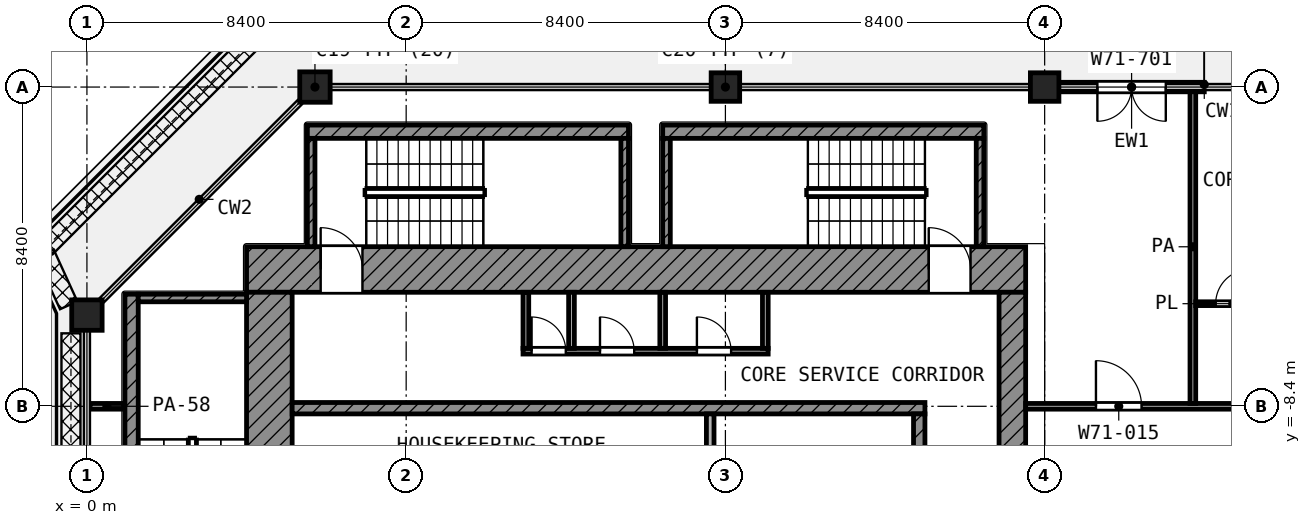
"""IFC4 building model, lengths in metres.
Left out: names, types, materials, properties, quantities, classifications, styles, units other than length and angle.
Written with IfcOpenShell. Run it as: python <this file> out.ifc"""

import sys

from ifc_helpers import new_model, si_unit, direction, frame, frame_2d, origin, origin_2d, place, context, subcontext, project, spatial, rectangle, extrude, element, fill, save


model = new_model("IFC4")
c1 = context("Model", 3, precision=1e-05, world=origin(), true_north=direction((0.0, 1.0)))
c2 = subcontext(c1, "Body", "Model", "MODEL_VIEW")
j1 = project(units=[si_unit("LENGTHUNIT", "METRE"), si_unit("PLANEANGLEUNIT", "RADIAN")], contexts=[c1])
p1 = place(None, origin())
s1 = spatial("IfcSite", under=j1, at=p1, CompositionType="ELEMENT")
p2 = place(p1, origin())
s2 = spatial("IfcBuilding", under=s1, at=p2, CompositionType="ELEMENT")
p3 = place(p2, frame((0.0, 0.0, 307.0)))
s3 = spatial("IfcBuildingStorey", under=s2, at=p3, CompositionType="ELEMENT", Elevation=307.0)
p4 = place(p3, frame((6.0, 0.0, 0.0), z_axis=(0.0, 0.0, 1.0), x_axis=(1.0, 0.0, 0.0)))
e1 = element("IfcColumn", 1, at=p4, inside=s3, PredefinedType="COLUMN", context=c2, shape_type="SweptSolid", body=[
    extrude(rectangle(XDim=0.8, YDim=0.8, at=origin_2d()), origin(), (0.0, 0.0, 1.0), 4.2),
])
for number, where, z_axis, x_axis in (
    (2, (16.8, 0.0, 0.0), (0.0, 0.0, 1.0), (1.0, 0.0, 0.0)),
    (3, (25.2, 0.0, 0.0), (0.0, 0.0, 1.0), (1.0, 0.0, 0.0)),
):
    element("IfcColumn", number, at=place(p3, frame(where, z_axis=z_axis, x_axis=x_axis)), inside=s3, PredefinedType="COLUMN", context=c2, shape_type="SweptSolid", body=[
        extrude(rectangle(XDim=0.75, YDim=0.75, at=origin_2d()), origin(), (0.0, 0.0, 1.0), 4.2),
    ])
p5 = place(p3, frame((0.0, -6.0, 0.0), z_axis=(0.0, 0.0, 1.0), x_axis=(1.0, 0.0, 0.0)))
e4 = element("IfcColumn", 4, at=p5, inside=s3, PredefinedType="COLUMN", context=c2, shape_type="SweptSolid", body=[
    extrude(rectangle(XDim=0.8, YDim=0.8, at=origin_2d()), origin(), (0.0, 0.0, 1.0), 4.2),
])
p6 = place(p3, frame((29.4, 0.0, 0.0), z_axis=(0.0, 0.0, 1.0), x_axis=(-1.0, 0.0, 0.0)))
e5 = element("IfcWall", 5, at=p6, inside=s3, PredefinedType="SOLIDWALL", context=c2, shape_type="SweptSolid", body=[
    extrude(rectangle(XDim=3.825, YDim=0.25, at=frame_2d((1.913, 0.0))), origin(), (0.0, 0.0, 1.0), 3.48),
])
p7 = place(p6, frame((1.012, 0.0, 0.0)))
e6 = element("IfcOpeningElement", 6, at=p7, cuts=e5, PredefinedType="OPENING", context=c2, shape_type="SweptSolid", body=[
    extrude(rectangle(XDim=1.8, YDim=2.1, at=frame_2d((0.9, 1.05))), frame((0.0, 0.135, 0.0), z_axis=(0.0, -1.0, 0.0), x_axis=(1.0, 0.0, 0.0)), (0.0, 0.0, 1.0), 0.27),
])
p8 = place(p3, frame((4.2, -4.8, 0.0), z_axis=(0.0, 0.0, 1.0), x_axis=(1.0, 0.0, 0.0)))
e7 = element("IfcWall", 7, at=p8, inside=s3, PredefinedType="SHEAR", context=c2, shape_type="SweptSolid", body=[
    extrude(rectangle(XDim=20.5, YDim=1.2, at=frame_2d((10.25, 0.0))), origin(), (0.0, 0.0, 1.0), 3.6),
])
p9 = place(p8, frame((1.95, 0.0, 0.0)))
e8 = element("IfcOpeningElement", 8, at=p9, cuts=e7, PredefinedType="OPENING", context=c2, shape_type="SweptSolid", body=[
    extrude(rectangle(XDim=1.1, YDim=2.1, at=frame_2d((0.55, 1.05))), frame((0.0, 0.61, 0.0), z_axis=(0.0, -1.0, 0.0), x_axis=(1.0, 0.0, 0.0)), (0.0, 0.0, 1.0), 1.22),
])
p10 = place(p8, frame((17.95, 0.0, 0.0)))
e9 = element("IfcOpeningElement", 9, at=p10, cuts=e7, PredefinedType="OPENING", context=c2, shape_type="SweptSolid", body=[
    extrude(rectangle(XDim=1.1, YDim=2.1, at=frame_2d((0.55, 1.05))), frame((0.0, 0.61, 0.0), z_axis=(0.0, -1.0, 0.0), x_axis=(1.0, 0.0, 0.0)), (0.0, 0.0, 1.0), 1.22),
])
p11 = place(p3, frame((4.8, -24.7, 0.0), z_axis=(0.0, 0.0, 1.0), x_axis=(0.0, 1.0, 0.0)))
e10 = element("IfcWall", 10, at=p11, inside=s3, PredefinedType="SHEAR", context=c2, shape_type="SweptSolid", body=[
    extrude(rectangle(XDim=19.3, YDim=1.2, at=frame_2d((9.65, 0.0))), origin(), (0.0, 0.0, 1.0), 3.6),
])
p12 = place(p11, frame((11.15, 0.0, 0.0)))
e11 = element("IfcOpeningElement", 11, at=p12, cuts=e10, PredefinedType="OPENING", context=c2, shape_type="SweptSolid", body=[
    extrude(rectangle(XDim=1.1, YDim=2.1, at=frame_2d((0.55, 1.05))), frame((0.0, 0.61, 0.0), z_axis=(0.0, -1.0, 0.0), x_axis=(1.0, 0.0, 0.0)), (0.0, 0.0, 1.0), 1.22),
])
p13 = place(p11, frame((1.85, 0.0, 0.0)))
e12 = element("IfcOpeningElement", 12, at=p13, cuts=e10, PredefinedType="OPENING", context=c2, shape_type="SweptSolid", body=[
    extrude(rectangle(XDim=1.1, YDim=2.1, at=frame_2d((0.55, 1.05))), frame((0.0, 0.61, 0.0), z_axis=(0.0, -1.0, 0.0), x_axis=(1.0, 0.0, 0.0)), (0.0, 0.0, 1.0), 1.22),
])
p14 = place(p3, frame((24.35, -24.0, 0.0), z_axis=(0.0, 0.0, 1.0), x_axis=(0.0, 1.0, 0.0)))
e13 = element("IfcWall", 13, at=p14, inside=s3, PredefinedType="SHEAR", context=c2, shape_type="SweptSolid", body=[
    extrude(rectangle(XDim=18.6, YDim=0.7, at=frame_2d((9.3, 0.0))), origin(), (0.0, 0.0, 1.0), 3.6),
])
p15 = place(p14, frame((10.5, 0.0, 0.0)))
e14 = element("IfcOpeningElement", 14, at=p15, cuts=e13, PredefinedType="OPENING", context=c2, shape_type="SweptSolid", body=[
    extrude(rectangle(XDim=1.8, YDim=2.1, at=frame_2d((0.9, 1.05))), frame((0.0, 0.36, 0.0), z_axis=(0.0, -1.0, 0.0), x_axis=(1.0, 0.0, 0.0)), (0.0, 0.0, 1.0), 0.72),
])
p16 = place(p3, frame((5.4, -8.45, 0.0), z_axis=(0.0, 0.0, 1.0), x_axis=(1.0, 0.0, 0.0)))
e15 = element("IfcWall", 15, at=p16, inside=s3, PredefinedType="SHEAR", context=c2, shape_type="SweptSolid", body=[
    extrude(rectangle(XDim=16.65, YDim=0.3, at=frame_2d((8.325, 0.0))), origin(), (0.0, 0.0, 1.0), 3.6),
])
p17 = place(p3, frame((21.9, -10.95, 0.0), z_axis=(0.0, 0.0, 1.0), x_axis=(0.0, 1.0, 0.0)))
e16 = element("IfcWall", 16, at=p17, inside=s3, PredefinedType="SHEAR", context=c2, shape_type="SweptSolid", body=[
    extrude(rectangle(XDim=2.35, YDim=0.3, at=frame_2d((1.175, 0.0))), origin(), (0.0, 0.0, 1.0), 3.6),
])
p18 = place(p3, frame((16.4, -10.95, 0.0), z_axis=(0.0, 0.0, 1.0), x_axis=(0.0, 1.0, 0.0)))
e17 = element("IfcWall", 17, at=p18, inside=s3, PredefinedType="PARTITIONING", context=c2, shape_type="SweptSolid", body=[
    extrude(rectangle(XDim=2.35, YDim=0.2, at=frame_2d((1.175, 0.0))), origin(), (0.0, 0.0, 1.0), 3.6),
])
p19 = place(p3, frame((11.475, -6.95, 0.0), z_axis=(0.0, 0.0, 1.0), x_axis=(1.0, 0.0, 0.0)))
e18 = element("IfcWall", 18, at=p19, inside=s3, PredefinedType="PARTITIONING", context=c2, shape_type="SweptSolid", body=[
    extrude(rectangle(XDim=6.45, YDim=0.15, at=frame_2d((3.225, 0.0))), origin(), (0.0, 0.0, 1.0), 3.6),
])
p20 = place(p19, frame((0.225, 0.0, 0.0)))
e19 = element("IfcOpeningElement", 19, at=p20, cuts=e18, PredefinedType="OPENING", context=c2, shape_type="SweptSolid", body=[
    extrude(rectangle(XDim=0.9, YDim=2.1, at=frame_2d((0.45, 1.05))), frame((0.0, 0.085, 0.0), z_axis=(0.0, -1.0, 0.0), x_axis=(1.0, 0.0, 0.0)), (0.0, 0.0, 1.0), 0.17),
])
p21 = place(p19, frame((2.025, 0.0, 0.0)))
e20 = element("IfcOpeningElement", 20, at=p21, cuts=e18, PredefinedType="OPENING", context=c2, shape_type="SweptSolid", body=[
    extrude(rectangle(XDim=0.9, YDim=2.1, at=frame_2d((0.45, 1.05))), frame((0.0, 0.085, 0.0), z_axis=(0.0, -1.0, 0.0), x_axis=(1.0, 0.0, 0.0)), (0.0, 0.0, 1.0), 0.17),
])
p22 = place(p19, frame((4.575, 0.0, 0.0)))
e21 = element("IfcOpeningElement", 21, at=p22, cuts=e18, PredefinedType="OPENING", context=c2, shape_type="SweptSolid", body=[
    extrude(rectangle(XDim=0.9, YDim=2.1, at=frame_2d((0.45, 1.05))), frame((0.0, 0.085, 0.0), z_axis=(0.0, -1.0, 0.0), x_axis=(1.0, 0.0, 0.0)), (0.0, 0.0, 1.0), 0.17),
])
for number, where, z_axis, x_axis in (
    (22, (11.55, -6.875, 0.0), (0.0, 0.0, 1.0), (0.0, 1.0, 0.0)),
    (23, (12.75, -6.875, 0.0), (0.0, 0.0, 1.0), (0.0, 1.0, 0.0)),
    (24, (15.15, -6.875, 0.0), (0.0, 0.0, 1.0), (0.0, 1.0, 0.0)),
    (25, (17.85, -6.875, 0.0), (0.0, 0.0, 1.0), (0.0, 1.0, 0.0)),
):
    element("IfcWall", number, at=place(p3, frame(where, z_axis=z_axis, x_axis=x_axis)), inside=s3, PredefinedType="PARTITIONING", context=c2, shape_type="SweptSolid", body=[
        extrude(rectangle(XDim=1.475, YDim=0.15, at=frame_2d((0.738, 0.0))), origin(), (0.0, 0.0, 1.0), 3.6),
    ])
p23 = place(p3, frame((1.175, -13.9, 0.0), z_axis=(0.0, 0.0, 1.0), x_axis=(0.0, 1.0, 0.0)))
e26 = element("IfcWall", 26, at=p23, inside=s3, PredefinedType="SHEAR", context=c2, shape_type="SweptSolid", body=[
    extrude(rectangle(XDim=8.45, YDim=0.35, at=frame_2d((4.225, 0.0))), origin(), (0.0, 0.0, 1.0), 3.6),
])
p24 = place(p3, frame((1.35, -5.55, 0.0), z_axis=(0.0, 0.0, 1.0), x_axis=(1.0, 0.0, 0.0)))
e27 = element("IfcWall", 27, at=p24, inside=s3, PredefinedType="SHEAR", context=c2, shape_type="SweptSolid", body=[
    extrude(rectangle(XDim=2.85, YDim=0.2, at=frame_2d((1.425, 0.0))), origin(), (0.0, 0.0, 1.0), 3.6),
])
p25 = place(p3, frame((5.8, -1.175, 0.0), z_axis=(0.0, 0.0, 1.0), x_axis=(1.0, 0.0, 0.0)))
e28 = element("IfcWall", 28, at=p25, inside=s3, PredefinedType="SHEAR", context=c2, shape_type="SweptSolid", body=[
    extrude(rectangle(XDim=8.45, YDim=0.35, at=frame_2d((4.225, 0.0))), origin(), (0.0, 0.0, 1.0), 3.6),
])
for number, where, z_axis, x_axis in (
    (29, (5.9, -4.2, 0.0), (0.0, 0.0, 1.0), (0.0, 1.0, 0.0)),
    (30, (14.15, -4.2, 0.0), (0.0, 0.0, 1.0), (0.0, 1.0, 0.0)),
):
    element("IfcWall", number, at=place(p3, frame(where, z_axis=z_axis, x_axis=x_axis)), inside=s3, PredefinedType="SHEAR", context=c2, shape_type="SweptSolid", body=[
        extrude(rectangle(XDim=2.85, YDim=0.2, at=frame_2d((1.425, 0.0))), origin(), (0.0, 0.0, 1.0), 3.6),
    ])
p26 = place(p3, frame((15.15, -1.175, 0.0), z_axis=(0.0, 0.0, 1.0), x_axis=(1.0, 0.0, 0.0)))
e31 = element("IfcWall", 31, at=p26, inside=s3, PredefinedType="SHEAR", context=c2, shape_type="SweptSolid", body=[
    extrude(rectangle(XDim=8.45, YDim=0.35, at=frame_2d((4.225, 0.0))), origin(), (0.0, 0.0, 1.0), 3.6),
])
for number, where, z_axis, x_axis in (
    (32, (15.25, -4.2, 0.0), (0.0, 0.0, 1.0), (0.0, 1.0, 0.0)),
    (33, (23.5, -4.2, 0.0), (0.0, 0.0, 1.0), (0.0, 1.0, 0.0)),
):
    element("IfcWall", number, at=place(p3, frame(where, z_axis=z_axis, x_axis=x_axis)), inside=s3, PredefinedType="SHEAR", context=c2, shape_type="SweptSolid", body=[
        extrude(rectangle(XDim=2.85, YDim=0.2, at=frame_2d((1.425, 0.0))), origin(), (0.0, 0.0, 1.0), 3.6),
    ])
p27 = place(p3, frame((29.175, -5.7, 0.0), z_axis=(0.0, 0.0, 1.0), x_axis=(1.0, 0.0, 0.0)))
e34 = element("IfcWall", 34, at=p27, inside=s3, PredefinedType="PARTITIONING", context=c2, shape_type="SweptSolid", body=[
    extrude(rectangle(XDim=1.975, YDim=0.1, at=frame_2d((0.987, 0.0))), origin(), (0.0, 0.0, 1.0), 3.6),
])
p28 = place(p27, frame((0.525, 0.0, 0.0)))
e35 = element("IfcOpeningElement", 35, at=p28, cuts=e34, PredefinedType="OPENING", context=c2, shape_type="SweptSolid", body=[
    extrude(rectangle(XDim=0.9, YDim=2.1, at=frame_2d((0.45, 1.05))), frame((0.0, 0.06, 0.0), z_axis=(0.0, -1.0, 0.0), x_axis=(1.0, 0.0, 0.0)), (0.0, 0.0, 1.0), 0.12),
])
p29 = place(p3, frame((0.08, -8.4, 0.0), z_axis=(0.0, 0.0, 1.0), x_axis=(1.0, 0.0, 0.0)))
e36 = element("IfcWall", 36, at=p29, inside=s3, PredefinedType="PARTITIONING", context=c2, shape_type="SweptSolid", body=[
    extrude(rectangle(XDim=0.89, YDim=0.15, at=frame_2d((0.445, 0.0))), origin(), (0.0, 0.0, 1.0), 2.7),
])
p30 = place(p3, frame((24.7, -8.4, 0.0), z_axis=(0.0, 0.0, 1.0), x_axis=(1.0, 0.0, 0.0)))
e37 = element("IfcWall", 37, at=p30, inside=s3, PredefinedType="PARTITIONING", context=c2, shape_type="SweptSolid", body=[
    extrude(rectangle(XDim=15.582, YDim=0.15, at=frame_2d((7.791, 0.0))), origin(), (0.0, 0.0, 1.0), 3.6),
])
p31 = place(p30, frame((1.85, 0.0, 0.0)))
e38 = element("IfcOpeningElement", 38, at=p31, cuts=e37, PredefinedType="OPENING", context=c2, shape_type="SweptSolid", body=[
    extrude(rectangle(XDim=1.2, YDim=2.1, at=frame_2d((0.6, 1.05))), frame((0.0, 0.085, 0.0), z_axis=(0.0, -1.0, 0.0), x_axis=(1.0, 0.0, 0.0)), (0.0, 0.0, 1.0), 0.17),
])
p32 = place(p30, frame((6.7, 0.0, 0.0)))
e39 = element("IfcOpeningElement", 39, at=p32, cuts=e37, PredefinedType="OPENING", context=c2, shape_type="SweptSolid", body=[
    extrude(rectangle(XDim=1.2, YDim=2.1, at=frame_2d((0.6, 1.05))), frame((0.0, 0.085, 0.0), z_axis=(0.0, -1.0, 0.0), x_axis=(1.0, 0.0, 0.0)), (0.0, 0.0, 1.0), 0.17),
])
p33 = place(p30, frame((9.4, 0.0, 0.0)))
e40 = element("IfcOpeningElement", 40, at=p33, cuts=e37, PredefinedType="OPENING", context=c2, shape_type="SweptSolid", body=[
    extrude(rectangle(XDim=1.2, YDim=2.1, at=frame_2d((0.6, 1.05))), frame((0.0, 0.085, 0.0), z_axis=(0.0, -1.0, 0.0), x_axis=(1.0, 0.0, 0.0)), (0.0, 0.0, 1.0), 0.17),
])
p34 = place(p3, frame((29.1, -8.325, 0.0), z_axis=(0.0, 0.0, 1.0), x_axis=(0.0, 1.0, 0.0)))
e41 = element("IfcWall", 41, at=p34, inside=s3, PredefinedType="PARTITIONING", context=c2, shape_type="SweptSolid", body=[
    extrude(rectangle(XDim=8.245, YDim=0.15, at=frame_2d((4.123, 0.0))), origin(), (0.0, 0.0, 1.0), 3.6),
])
p35 = place(p7, origin())
e42 = element("IfcDoor", 42, at=p35, inside=s3, OperationType="DOUBLE_DOOR_SINGLE_SWING", PredefinedType="DOOR", context=c2, shape_type="SweptSolid", body=[
    extrude(rectangle(XDim=1.8, YDim=2.1, at=frame_2d((0.9, 1.05))), frame((0.0, 0.025, 0.0), z_axis=(0.0, -1.0, 0.0), x_axis=(1.0, 0.0, 0.0)), (0.0, 0.0, 1.0), 0.05),
])
fill(e6, e42)
p36 = place(p9, origin())
e43 = element("IfcDoor", 43, at=p36, inside=s3, OperationType="SINGLE_SWING_LEFT", PredefinedType="DOOR", context=c2, shape_type="SweptSolid", body=[
    extrude(rectangle(XDim=1.1, YDim=2.1, at=frame_2d((0.55, 1.05))), frame((0.0, 0.025, 0.0), z_axis=(0.0, -1.0, 0.0), x_axis=(1.0, 0.0, 0.0)), (0.0, 0.0, 1.0), 0.05),
])
fill(e8, e43)
p37 = place(p10, origin())
e44 = element("IfcDoor", 44, at=p37, inside=s3, OperationType="SINGLE_SWING_LEFT", PredefinedType="DOOR", context=c2, shape_type="SweptSolid", body=[
    extrude(rectangle(XDim=1.1, YDim=2.1, at=frame_2d((0.55, 1.05))), frame((0.0, 0.025, 0.0), z_axis=(0.0, -1.0, 0.0), x_axis=(1.0, 0.0, 0.0)), (0.0, 0.0, 1.0), 0.05),
])
fill(e9, e44)
p38 = place(p20, origin())
e45 = element("IfcDoor", 45, at=p38, inside=s3, OperationType="SINGLE_SWING_LEFT", PredefinedType="DOOR", context=c2, shape_type="SweptSolid", body=[
    extrude(rectangle(XDim=0.9, YDim=2.1, at=frame_2d((0.45, 1.05))), frame((0.0, 0.025, 0.0), z_axis=(0.0, -1.0, 0.0), x_axis=(1.0, 0.0, 0.0)), (0.0, 0.0, 1.0), 0.05),
])
fill(e19, e45)
p39 = place(p21, origin())
e46 = element("IfcDoor", 46, at=p39, inside=s3, OperationType="SINGLE_SWING_LEFT", PredefinedType="DOOR", context=c2, shape_type="SweptSolid", body=[
    extrude(rectangle(XDim=0.9, YDim=2.1, at=frame_2d((0.45, 1.05))), frame((0.0, 0.025, 0.0), z_axis=(0.0, -1.0, 0.0), x_axis=(1.0, 0.0, 0.0)), (0.0, 0.0, 1.0), 0.05),
])
fill(e20, e46)
p40 = place(p22, origin())
e47 = element("IfcDoor", 47, at=p40, inside=s3, OperationType="SINGLE_SWING_LEFT", PredefinedType="DOOR", context=c2, shape_type="SweptSolid", body=[
    extrude(rectangle(XDim=0.9, YDim=2.1, at=frame_2d((0.45, 1.05))), frame((0.0, 0.025, 0.0), z_axis=(0.0, -1.0, 0.0), x_axis=(1.0, 0.0, 0.0)), (0.0, 0.0, 1.0), 0.05),
])
fill(e21, e47)
p41 = place(p31, origin())
e48 = element("IfcDoor", 48, at=p41, inside=s3, OperationType="SINGLE_SWING_LEFT", PredefinedType="DOOR", context=c2, shape_type="SweptSolid", body=[
    extrude(rectangle(XDim=1.2, YDim=2.1, at=frame_2d((0.6, 1.05))), frame((0.0, 0.025, 0.0), z_axis=(0.0, -1.0, 0.0), x_axis=(1.0, 0.0, 0.0)), (0.0, 0.0, 1.0), 0.05),
])
fill(e38, e48)
p42 = place(p28, origin())
e49 = element("IfcDoor", 49, at=p42, inside=s3, OperationType="SINGLE_SWING_RIGHT", PredefinedType="DOOR", context=c2, shape_type="SweptSolid", body=[
    extrude(rectangle(XDim=0.9, YDim=2.1, at=frame_2d((0.45, 1.05))), frame((0.0, 0.025, 0.0), z_axis=(0.0, -1.0, 0.0), x_axis=(1.0, 0.0, 0.0)), (0.0, 0.0, 1.0), 0.05),
])
fill(e35, e49)
save(model, sys.argv[1])
